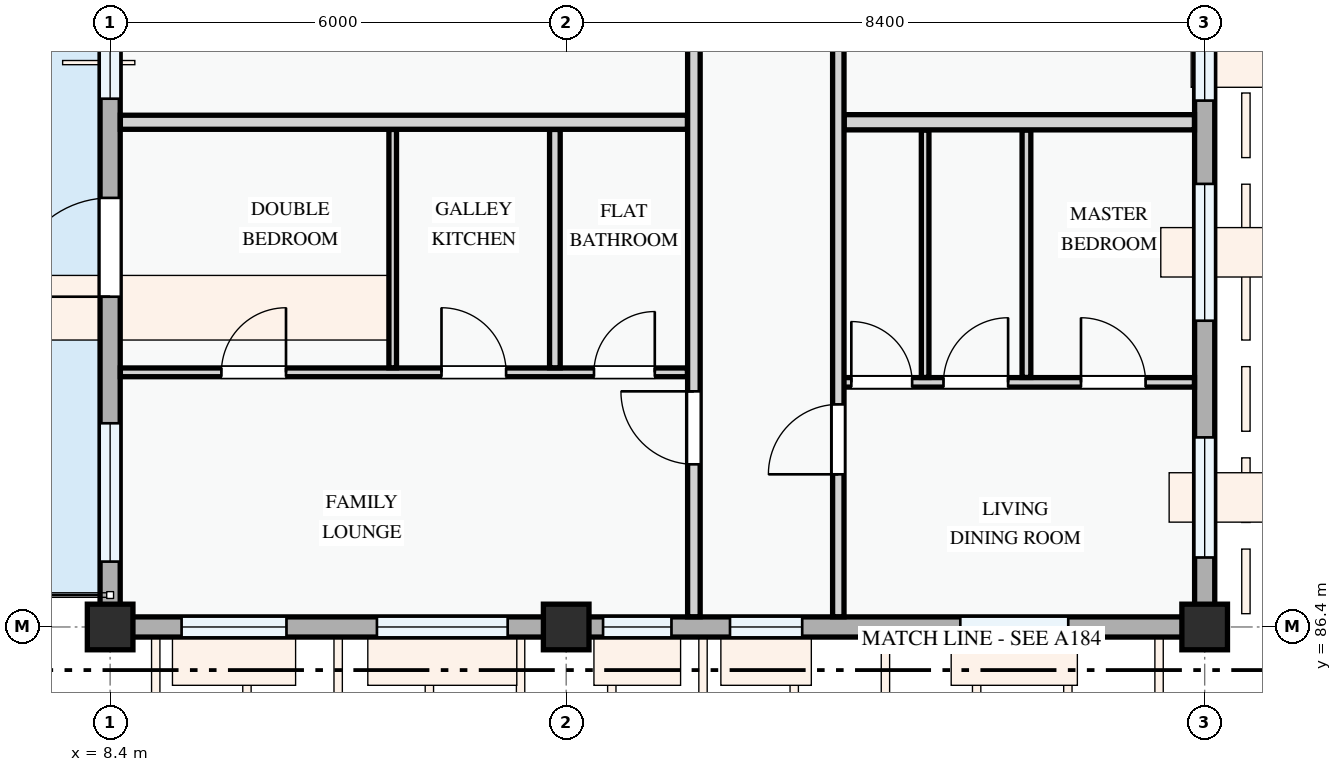
"""IFC4 building model, lengths in metres.
Left out: names, types, materials, properties, quantities, classifications, styles, units other than length and angle.
Written with IfcOpenShell. Run it as: python <this file> out.ifc"""

import sys

from ifc_helpers import new_model, si_unit, direction, frame, frame_2d, origin, origin_2d, place, context, subcontext, project, spatial, rectangle, extrude, element, fill, save


model = new_model("IFC4")
c1 = context("Model", 3, precision=1e-05, world=origin(), true_north=direction((0.0, 1.0)))
c2 = subcontext(c1, "Body", "Model", "MODEL_VIEW")
j1 = project(units=[si_unit("LENGTHUNIT", "METRE"), si_unit("PLANEANGLEUNIT", "RADIAN")], contexts=[c1])
p1 = place(None, origin())
s1 = spatial("IfcSite", under=j1, at=p1, CompositionType="ELEMENT")
p2 = place(p1, origin())
s2 = spatial("IfcBuilding", under=s1, at=p2, CompositionType="ELEMENT")
p3 = place(p2, frame((0.0, 0.0, 34.5)))
s3 = spatial("IfcBuildingStorey", under=s2, at=p3, CompositionType="ELEMENT", Elevation=34.5)
for number, where, z_axis, x_axis in (
    (1, (8.4, 86.4, 0.0), (0.0, 0.0, 1.0), (1.0, 0.0, 0.0)),
    (2, (14.4, 86.4, 0.0), (0.0, 0.0, 1.0), (1.0, 0.0, 0.0)),
    (3, (22.8, 86.4, 0.0), (0.0, 0.0, 1.0), (1.0, 0.0, 0.0)),
):
    element("IfcColumn", number, at=place(p3, frame(where, z_axis=z_axis, x_axis=x_axis)), inside=s3, PredefinedType="COLUMN", context=c2, shape_type="SweptSolid", body=[
        extrude(rectangle(XDim=0.6, YDim=0.6, at=origin_2d()), origin(), (0.0, 0.0, 1.0), 3.3),
    ])
p4 = place(p3, frame((8.4, 94.8, 0.0), z_axis=(0.0, 0.0, 1.0), x_axis=(0.0, -1.0, 0.0)))
e4 = element("IfcWall", 4, at=p4, inside=s3, PredefinedType="STANDARD", context=c2, shape_type="SweptSolid", body=[
    extrude(rectangle(XDim=8.4, YDim=0.265, at=frame_2d((4.2, 0.0))), origin(), (0.0, 0.0, 1.0), 2.345),
])
p5 = place(p4, frame((2.755, 0.0, 0.0)))
e5 = element("IfcOpeningElement", 5, at=p5, cuts=e4, PredefinedType="OPENING", context=c2, shape_type="SweptSolid", body=[
    extrude(rectangle(XDim=1.3, YDim=2.15, at=frame_2d((0.65, 1.075))), frame((0.0, 0.143, 0.0), z_axis=(0.0, -1.0, 0.0), x_axis=(1.0, 0.0, 0.0)), (0.0, 0.0, 1.0), 0.285),
])
p6 = place(p4, frame((0.5, 0.0, 0.78)))
e6 = element("IfcOpeningElement", 6, at=p6, cuts=e4, PredefinedType="OPENING", context=c2, shape_type="SweptSolid", body=[
    extrude(rectangle(XDim=0.95, YDim=1.15, at=frame_2d((0.475, 0.575))), frame((0.0, 0.143, 0.0), z_axis=(0.0, -1.0, 0.0), x_axis=(1.0, 0.0, 0.0)), (0.0, 0.0, 1.0), 0.285),
])
p7 = place(p4, frame((5.72, 0.0, 0.78)))
e7 = element("IfcOpeningElement", 7, at=p7, cuts=e4, PredefinedType="OPENING", context=c2, shape_type="SweptSolid", body=[
    extrude(rectangle(XDim=1.82, YDim=1.46, at=frame_2d((0.91, 0.73))), frame((0.0, 0.143, 0.0), z_axis=(0.0, -1.0, 0.0), x_axis=(1.0, 0.0, 0.0)), (0.0, 0.0, 1.0), 0.285),
])
p8 = place(p3, frame((8.4, 86.4, 0.0), z_axis=(0.0, 0.0, 1.0), x_axis=(1.0, 0.0, 0.0)))
e8 = element("IfcWall", 8, at=p8, inside=s3, PredefinedType="STANDARD", context=c2, shape_type="SweptSolid", body=[
    extrude(rectangle(XDim=6.0, YDim=0.265, at=frame_2d((3.0, 0.0))), origin(), (0.0, 0.0, 1.0), 2.525),
])
p9 = place(p8, frame((0.94, 0.0, 0.78)))
e9 = element("IfcOpeningElement", 9, at=p9, cuts=e8, PredefinedType="OPENING", context=c2, shape_type="SweptSolid", body=[
    extrude(rectangle(XDim=1.38, YDim=1.48, at=frame_2d((0.69, 0.74))), frame((0.0, 0.143, 0.0), z_axis=(0.0, -1.0, 0.0), x_axis=(1.0, 0.0, 0.0)), (0.0, 0.0, 1.0), 0.285),
])
p10 = place(p8, frame((3.51, 0.0, 0.78)))
e10 = element("IfcOpeningElement", 10, at=p10, cuts=e8, PredefinedType="OPENING", context=c2, shape_type="SweptSolid", body=[
    extrude(rectangle(XDim=1.72, YDim=1.52, at=frame_2d((0.86, 0.76))), frame((0.0, 0.143, 0.0), z_axis=(0.0, -1.0, 0.0), x_axis=(1.0, 0.0, 0.0)), (0.0, 0.0, 1.0), 0.285),
])
p11 = place(p3, frame((14.4, 86.4, 0.0), z_axis=(0.0, 0.0, 1.0), x_axis=(1.0, 0.0, 0.0)))
e11 = element("IfcWall", 11, at=p11, inside=s3, PredefinedType="STANDARD", context=c2, shape_type="SweptSolid", body=[
    extrude(rectangle(XDim=8.4, YDim=0.265, at=frame_2d((4.2, 0.0))), origin(), (0.0, 0.0, 1.0), 2.375),
])
p12 = place(p11, frame((0.485, 0.0, 0.78)))
e12 = element("IfcOpeningElement", 12, at=p12, cuts=e11, PredefinedType="OPENING", context=c2, shape_type="SweptSolid", body=[
    extrude(rectangle(XDim=0.9, YDim=1.2, at=frame_2d((0.45, 0.6))), frame((0.0, 0.143, 0.0), z_axis=(0.0, -1.0, 0.0), x_axis=(1.0, 0.0, 0.0)), (0.0, 0.0, 1.0), 0.285),
])
p13 = place(p11, frame((2.155, 0.0, 0.78)))
e13 = element("IfcOpeningElement", 13, at=p13, cuts=e11, PredefinedType="OPENING", context=c2, shape_type="SweptSolid", body=[
    extrude(rectangle(XDim=0.95, YDim=1.15, at=frame_2d((0.475, 0.575))), frame((0.0, 0.143, 0.0), z_axis=(0.0, -1.0, 0.0), x_axis=(1.0, 0.0, 0.0)), (0.0, 0.0, 1.0), 0.285),
])
p14 = place(p11, frame((5.185, 0.0, 0.78)))
e14 = element("IfcOpeningElement", 14, at=p14, cuts=e11, PredefinedType="OPENING", context=c2, shape_type="SweptSolid", body=[
    extrude(rectangle(XDim=1.42, YDim=1.38, at=frame_2d((0.71, 0.69))), frame((0.0, 0.143, 0.0), z_axis=(0.0, -1.0, 0.0), x_axis=(1.0, 0.0, 0.0)), (0.0, 0.0, 1.0), 0.285),
])
p15 = place(p3, frame((22.8, 86.4, 0.0), z_axis=(0.0, 0.0, 1.0), x_axis=(0.0, 1.0, 0.0)))
e15 = element("IfcWall", 15, at=p15, inside=s3, PredefinedType="STANDARD", context=c2, shape_type="SweptSolid", body=[
    extrude(rectangle(XDim=8.4, YDim=0.265, at=frame_2d((4.2, 0.0))), origin(), (0.0, 0.0, 1.0), 2.425),
])
p16 = place(p15, frame((0.914, 0.0, 0.78)))
e16 = element("IfcOpeningElement", 16, at=p16, cuts=e15, PredefinedType="OPENING", context=c2, shape_type="SweptSolid", body=[
    extrude(rectangle(XDim=1.58, YDim=1.48, at=frame_2d((0.79, 0.74))), frame((0.0, 0.143, 0.0), z_axis=(0.0, -1.0, 0.0), x_axis=(1.0, 0.0, 0.0)), (0.0, 0.0, 1.0), 0.285),
])
p17 = place(p15, frame((4.029, 0.0, 0.78)))
e17 = element("IfcOpeningElement", 17, at=p17, cuts=e15, PredefinedType="OPENING", context=c2, shape_type="SweptSolid", body=[
    extrude(rectangle(XDim=1.8, YDim=1.5, at=frame_2d((0.9, 0.75))), frame((0.0, 0.143, 0.0), z_axis=(0.0, -1.0, 0.0), x_axis=(1.0, 0.0, 0.0)), (0.0, 0.0, 1.0), 0.285),
])
p18 = place(p15, frame((6.925, 0.0, 0.78)))
e18 = element("IfcOpeningElement", 18, at=p18, cuts=e15, PredefinedType="OPENING", context=c2, shape_type="SweptSolid", body=[
    extrude(rectangle(XDim=1.0, YDim=1.25, at=frame_2d((0.5, 0.625))), frame((0.0, 0.143, 0.0), z_axis=(0.0, -1.0, 0.0), x_axis=(1.0, 0.0, 0.0)), (0.0, 0.0, 1.0), 0.285),
])
p19 = place(p3, frame((8.534, 89.75, 0.0), z_axis=(0.0, 0.0, 1.0), x_axis=(1.0, 0.0, 0.0)))
e19 = element("IfcWall", 19, at=p19, inside=s3, PredefinedType="PARTITIONING", context=c2, shape_type="SweptSolid", body=[
    extrude(rectangle(XDim=7.461, YDim=0.115, at=frame_2d((3.73, 0.0))), origin(), (0.0, 0.0, 1.0), 3.0),
])
p20 = place(p19, frame((1.329, 0.0, 0.0)))
e20 = element("IfcOpeningElement", 20, at=p20, cuts=e19, PredefinedType="OPENING", context=c2, shape_type="SweptSolid", body=[
    extrude(rectangle(XDim=0.85, YDim=2.1, at=frame_2d((0.425, 1.05))), frame((0.0, 0.067, 0.0), z_axis=(0.0, -1.0, 0.0), x_axis=(1.0, 0.0, 0.0)), (0.0, 0.0, 1.0), 0.135),
])
p21 = place(p19, frame((4.225, 0.0, 0.0)))
e21 = element("IfcOpeningElement", 21, at=p21, cuts=e19, PredefinedType="OPENING", context=c2, shape_type="SweptSolid", body=[
    extrude(rectangle(XDim=0.85, YDim=2.1, at=frame_2d((0.425, 1.05))), frame((0.0, 0.067, 0.0), z_axis=(0.0, -1.0, 0.0), x_axis=(1.0, 0.0, 0.0)), (0.0, 0.0, 1.0), 0.135),
])
p22 = place(p19, frame((6.231, 0.0, 0.0)))
e22 = element("IfcOpeningElement", 22, at=p22, cuts=e19, PredefinedType="OPENING", context=c2, shape_type="SweptSolid", body=[
    extrude(rectangle(XDim=0.8, YDim=2.1, at=frame_2d((0.4, 1.05))), frame((0.0, 0.067, 0.0), z_axis=(0.0, -1.0, 0.0), x_axis=(1.0, 0.0, 0.0)), (0.0, 0.0, 1.0), 0.135),
])
p23 = place(p3, frame((12.118, 89.81, 0.0), z_axis=(0.0, 0.0, 1.0), x_axis=(0.0, 1.0, 0.0)))
e23 = element("IfcWall", 23, at=p23, inside=s3, PredefinedType="PARTITIONING", context=c2, shape_type="SweptSolid", body=[
    extrude(rectangle(XDim=3.136, YDim=0.1, at=frame_2d((1.568, 0.0))), origin(), (0.0, 0.0, 1.0), 3.0),
])
p24 = place(p3, frame((14.251, 89.81, 0.0), z_axis=(0.0, 0.0, 1.0), x_axis=(0.0, 1.0, 0.0)))
e24 = element("IfcWall", 24, at=p24, inside=s3, PredefinedType="PARTITIONING", context=c2, shape_type="SweptSolid", body=[
    extrude(rectangle(XDim=3.136, YDim=0.14, at=frame_2d((1.568, 0.0))), origin(), (0.0, 0.0, 1.0), 2.425),
])
p25 = place(p3, frame((17.98, 89.618, 0.0), z_axis=(0.0, 0.0, 1.0), x_axis=(1.0, 0.0, 0.0)))
e25 = element("IfcWall", 25, at=p25, inside=s3, PredefinedType="PARTITIONING", context=c2, shape_type="SweptSolid", body=[
    extrude(rectangle(XDim=4.686, YDim=0.125, at=frame_2d((2.343, 0.0))), origin(), (0.0, 0.0, 1.0), 3.0),
])
p26 = place(p25, frame((0.171, 0.0, 0.0)))
e26 = element("IfcOpeningElement", 26, at=p26, cuts=e25, PredefinedType="OPENING", context=c2, shape_type="SweptSolid", body=[
    extrude(rectangle(XDim=0.8, YDim=2.1, at=frame_2d((0.4, 1.05))), frame((0.0, 0.073, 0.0), z_axis=(0.0, -1.0, 0.0), x_axis=(1.0, 0.0, 0.0)), (0.0, 0.0, 1.0), 0.145),
])
p27 = place(p25, frame((1.384, 0.0, 0.0)))
e27 = element("IfcOpeningElement", 27, at=p27, cuts=e25, PredefinedType="OPENING", context=c2, shape_type="SweptSolid", body=[
    extrude(rectangle(XDim=0.85, YDim=2.1, at=frame_2d((0.425, 1.05))), frame((0.0, 0.073, 0.0), z_axis=(0.0, -1.0, 0.0), x_axis=(1.0, 0.0, 0.0)), (0.0, 0.0, 1.0), 0.145),
])
p28 = place(p25, frame((3.193, 0.0, 0.0)))
e28 = element("IfcOpeningElement", 28, at=p28, cuts=e25, PredefinedType="OPENING", context=c2, shape_type="SweptSolid", body=[
    extrude(rectangle(XDim=0.85, YDim=2.1, at=frame_2d((0.425, 1.05))), frame((0.0, 0.073, 0.0), z_axis=(0.0, -1.0, 0.0), x_axis=(1.0, 0.0, 0.0)), (0.0, 0.0, 1.0), 0.145),
])
p29 = place(p3, frame((20.455, 89.683, 0.0), z_axis=(0.0, 0.0, 1.0), x_axis=(0.0, 1.0, 0.0)))
e29 = element("IfcWall", 29, at=p29, inside=s3, PredefinedType="PARTITIONING", context=c2, shape_type="SweptSolid", body=[
    extrude(rectangle(XDim=3.255, YDim=0.115, at=frame_2d((1.627, 0.0))), origin(), (0.0, 0.0, 1.0), 3.0),
])
p30 = place(p3, frame((19.122, 89.683, 0.0), z_axis=(0.0, 0.0, 1.0), x_axis=(0.0, 1.0, 0.0)))
e30 = element("IfcWall", 30, at=p30, inside=s3, PredefinedType="PARTITIONING", context=c2, shape_type="SweptSolid", body=[
    extrude(rectangle(XDim=3.255, YDim=0.1, at=frame_2d((1.627, 0.0))), origin(), (0.0, 0.0, 1.0), 3.0),
])
p31 = place(p3, frame((8.534, 93.04, 0.0), z_axis=(0.0, 0.0, 1.0), x_axis=(1.0, 0.0, 0.0)))
e31 = element("IfcWall", 31, at=p31, inside=s3, PredefinedType="PARTITIONING", context=c2, shape_type="SweptSolid", body=[
    extrude(rectangle(XDim=7.461, YDim=0.185, at=frame_2d((3.73, 0.0))), origin(), (0.0, 0.0, 1.0), 3.0),
])
p32 = place(p3, frame((18.057, 93.04, 0.0), z_axis=(0.0, 0.0, 1.0), x_axis=(1.0, 0.0, 0.0)))
e32 = element("IfcWall", 32, at=p32, inside=s3, PredefinedType="PARTITIONING", context=c2, shape_type="SweptSolid", body=[
    extrude(rectangle(XDim=4.609, YDim=0.2, at=frame_2d((2.304, 0.0))), origin(), (0.0, 0.0, 1.0), 3.0),
])
p33 = place(p3, frame((16.08, 86.534, 0.0), z_axis=(0.0, 0.0, 1.0), x_axis=(0.0, 1.0, 0.0)))
e33 = element("IfcWall", 33, at=p33, inside=s3, PredefinedType="PARTITIONING", context=c2, shape_type="SweptSolid", body=[
    extrude(rectangle(XDim=22.806, YDim=0.165, at=frame_2d((11.403, 0.0))), origin(), (0.0, 0.0, 1.0), 3.0),
])
p34 = place(p33, frame((2.006, 0.0, 0.0)))
e34 = element("IfcOpeningElement", 34, at=p34, cuts=e33, PredefinedType="OPENING", context=c2, shape_type="SweptSolid", body=[
    extrude(rectangle(XDim=0.96, YDim=2.12, at=frame_2d((0.48, 1.06))), frame((0.0, 0.093, 0.0), z_axis=(0.0, -1.0, 0.0), x_axis=(1.0, 0.0, 0.0)), (0.0, 0.0, 1.0), 0.185),
])
p35 = place(p33, frame((10.035, 0.0, 0.0)))
e35 = element("IfcOpeningElement", 35, at=p35, cuts=e33, PredefinedType="OPENING", context=c2, shape_type="SweptSolid", body=[
    extrude(rectangle(XDim=0.92, YDim=2.1, at=frame_2d((0.46, 1.05))), frame((0.0, 0.093, 0.0), z_axis=(0.0, -1.0, 0.0), x_axis=(1.0, 0.0, 0.0)), (0.0, 0.0, 1.0), 0.185),
])
p36 = place(p33, frame((18.003, 0.0, 0.0)))
e36 = element("IfcOpeningElement", 36, at=p36, cuts=e33, PredefinedType="OPENING", context=c2, shape_type="SweptSolid", body=[
    extrude(rectangle(XDim=0.92, YDim=2.1, at=frame_2d((0.46, 1.05))), frame((0.0, 0.093, 0.0), z_axis=(0.0, -1.0, 0.0), x_axis=(1.0, 0.0, 0.0)), (0.0, 0.0, 1.0), 0.185),
])
p37 = place(p3, frame((17.98, 86.534, 0.0), z_axis=(0.0, 0.0, 1.0), x_axis=(0.0, 1.0, 0.0)))
e37 = element("IfcWall", 37, at=p37, inside=s3, PredefinedType="PARTITIONING", context=c2, shape_type="SweptSolid", body=[
    extrude(rectangle(XDim=22.806, YDim=0.15, at=frame_2d((11.403, 0.0))), origin(), (0.0, 0.0, 1.0), 3.0),
])
p38 = place(p37, frame((1.874, 0.0, 0.0)))
e38 = element("IfcOpeningElement", 38, at=p38, cuts=e37, PredefinedType="OPENING", context=c2, shape_type="SweptSolid", body=[
    extrude(rectangle(XDim=0.92, YDim=2.1, at=frame_2d((0.46, 1.05))), frame((0.0, 0.085, 0.0), z_axis=(0.0, -1.0, 0.0), x_axis=(1.0, 0.0, 0.0)), (0.0, 0.0, 1.0), 0.17),
])
p39 = place(p37, frame((9.846, 0.0, 0.0)))
e39 = element("IfcOpeningElement", 39, at=p39, cuts=e37, PredefinedType="OPENING", context=c2, shape_type="SweptSolid", body=[
    extrude(rectangle(XDim=0.92, YDim=2.1, at=frame_2d((0.46, 1.05))), frame((0.0, 0.085, 0.0), z_axis=(0.0, -1.0, 0.0), x_axis=(1.0, 0.0, 0.0)), (0.0, 0.0, 1.0), 0.17),
])
p40 = place(p37, frame((17.992, 0.0, 0.0)))
e40 = element("IfcOpeningElement", 40, at=p40, cuts=e37, PredefinedType="OPENING", context=c2, shape_type="SweptSolid", body=[
    extrude(rectangle(XDim=0.96, YDim=2.12, at=frame_2d((0.48, 1.06))), frame((0.0, 0.085, 0.0), z_axis=(0.0, -1.0, 0.0), x_axis=(1.0, 0.0, 0.0)), (0.0, 0.0, 1.0), 0.17),
])
p41 = place(p5, frame((1.3, 0.0, 0.0), z_axis=(0.0, 0.0, 1.0), x_axis=(-1.0, 0.0, 0.0)))
e41 = element("IfcDoor", 41, at=p41, inside=s3, OperationType="SINGLE_SWING_LEFT", PredefinedType="DOOR", context=c2, shape_type="SweptSolid", body=[
    extrude(rectangle(XDim=1.3, YDim=2.15, at=frame_2d((0.65, 1.075))), frame((0.0, 0.025, 0.0), z_axis=(0.0, -1.0, 0.0), x_axis=(1.0, 0.0, 0.0)), (0.0, 0.0, 1.0), 0.05),
])
fill(e5, e41)
p42 = place(p6, origin())
e42 = element("IfcWindow", 42, at=p42, inside=s3, PartitioningType="SINGLE_PANEL", PredefinedType="WINDOW", context=c2, shape_type="SweptSolid", body=[
    extrude(rectangle(XDim=0.95, YDim=1.15, at=frame_2d((0.475, 0.575))), frame((0.0, 0.03, 0.0), z_axis=(0.0, -1.0, 0.0), x_axis=(1.0, 0.0, 0.0)), (0.0, 0.0, 1.0), 0.06),
])
fill(e6, e42)
p43 = place(p7, origin())
e43 = element("IfcWindow", 43, at=p43, inside=s3, PartitioningType="DOUBLE_PANEL_VERTICAL", PredefinedType="WINDOW", context=c2, shape_type="SweptSolid", body=[
    extrude(rectangle(XDim=1.82, YDim=1.46, at=frame_2d((0.91, 0.73))), frame((0.0, 0.03, 0.0), z_axis=(0.0, -1.0, 0.0), x_axis=(1.0, 0.0, 0.0)), (0.0, 0.0, 1.0), 0.06),
])
fill(e7, e43)
p44 = place(p9, origin())
e44 = element("IfcWindow", 44, at=p44, inside=s3, PartitioningType="SINGLE_PANEL", PredefinedType="WINDOW", context=c2, shape_type="SweptSolid", body=[
    extrude(rectangle(XDim=1.38, YDim=1.48, at=frame_2d((0.69, 0.74))), frame((0.0, 0.03, 0.0), z_axis=(0.0, -1.0, 0.0), x_axis=(1.0, 0.0, 0.0)), (0.0, 0.0, 1.0), 0.06),
])
fill(e9, e44)
p45 = place(p10, origin())
e45 = element("IfcWindow", 45, at=p45, inside=s3, PartitioningType="DOUBLE_PANEL_VERTICAL", PredefinedType="WINDOW", context=c2, shape_type="SweptSolid", body=[
    extrude(rectangle(XDim=1.72, YDim=1.52, at=frame_2d((0.86, 0.76))), frame((0.0, 0.03, 0.0), z_axis=(0.0, -1.0, 0.0), x_axis=(1.0, 0.0, 0.0)), (0.0, 0.0, 1.0), 0.06),
])
fill(e10, e45)
p46 = place(p12, origin())
e46 = element("IfcWindow", 46, at=p46, inside=s3, PartitioningType="SINGLE_PANEL", PredefinedType="WINDOW", context=c2, shape_type="SweptSolid", body=[
    extrude(rectangle(XDim=0.9, YDim=1.2, at=frame_2d((0.45, 0.6))), frame((0.0, 0.03, 0.0), z_axis=(0.0, -1.0, 0.0), x_axis=(1.0, 0.0, 0.0)), (0.0, 0.0, 1.0), 0.06),
])
fill(e12, e46)
p47 = place(p13, origin())
e47 = element("IfcWindow", 47, at=p47, inside=s3, PartitioningType="SINGLE_PANEL", PredefinedType="WINDOW", context=c2, shape_type="SweptSolid", body=[
    extrude(rectangle(XDim=0.95, YDim=1.15, at=frame_2d((0.475, 0.575))), frame((0.0, 0.03, 0.0), z_axis=(0.0, -1.0, 0.0), x_axis=(1.0, 0.0, 0.0)), (0.0, 0.0, 1.0), 0.06),
])
fill(e13, e47)
p48 = place(p14, origin())
e48 = element("IfcWindow", 48, at=p48, inside=s3, PartitioningType="SINGLE_PANEL", PredefinedType="WINDOW", context=c2, shape_type="SweptSolid", body=[
    extrude(rectangle(XDim=1.42, YDim=1.38, at=frame_2d((0.71, 0.69))), frame((0.0, 0.03, 0.0), z_axis=(0.0, -1.0, 0.0), x_axis=(1.0, 0.0, 0.0)), (0.0, 0.0, 1.0), 0.06),
])
fill(e14, e48)
p49 = place(p16, origin())
e49 = element("IfcWindow", 49, at=p49, inside=s3, PartitioningType="SINGLE_PANEL", PredefinedType="WINDOW", context=c2, shape_type="SweptSolid", body=[
    extrude(rectangle(XDim=1.58, YDim=1.48, at=frame_2d((0.79, 0.74))), frame((0.0, 0.03, 0.0), z_axis=(0.0, -1.0, 0.0), x_axis=(1.0, 0.0, 0.0)), (0.0, 0.0, 1.0), 0.06),
])
fill(e16, e49)
p50 = place(p17, origin())
e50 = element("IfcWindow", 50, at=p50, inside=s3, PartitioningType="DOUBLE_PANEL_VERTICAL", PredefinedType="WINDOW", context=c2, shape_type="SweptSolid", body=[
    extrude(rectangle(XDim=1.8, YDim=1.5, at=frame_2d((0.9, 0.75))), frame((0.0, 0.03, 0.0), z_axis=(0.0, -1.0, 0.0), x_axis=(1.0, 0.0, 0.0)), (0.0, 0.0, 1.0), 0.06),
])
fill(e17, e50)
p51 = place(p18, origin())
e51 = element("IfcWindow", 51, at=p51, inside=s3, PartitioningType="SINGLE_PANEL", PredefinedType="WINDOW", context=c2, shape_type="SweptSolid", body=[
    extrude(rectangle(XDim=1.0, YDim=1.25, at=frame_2d((0.5, 0.625))), frame((0.0, 0.03, 0.0), z_axis=(0.0, -1.0, 0.0), x_axis=(1.0, 0.0, 0.0)), (0.0, 0.0, 1.0), 0.06),
])
fill(e18, e51)
p52 = place(p20, origin())
e52 = element("IfcDoor", 52, at=p52, inside=s3, OperationType="SINGLE_SWING_RIGHT", PredefinedType="DOOR", context=c2, shape_type="SweptSolid", body=[
    extrude(rectangle(XDim=0.85, YDim=2.1, at=frame_2d((0.425, 1.05))), frame((0.0, 0.025, 0.0), z_axis=(0.0, -1.0, 0.0), x_axis=(1.0, 0.0, 0.0)), (0.0, 0.0, 1.0), 0.05),
])
fill(e20, e52)
p53 = place(p21, origin())
e53 = element("IfcDoor", 53, at=p53, inside=s3, OperationType="SINGLE_SWING_LEFT", PredefinedType="DOOR", context=c2, shape_type="SweptSolid", body=[
    extrude(rectangle(XDim=0.85, YDim=2.1, at=frame_2d((0.425, 1.05))), frame((0.0, 0.025, 0.0), z_axis=(0.0, -1.0, 0.0), x_axis=(1.0, 0.0, 0.0)), (0.0, 0.0, 1.0), 0.05),
])
fill(e21, e53)
p54 = place(p22, origin())
e54 = element("IfcDoor", 54, at=p54, inside=s3, OperationType="SINGLE_SWING_RIGHT", PredefinedType="DOOR", context=c2, shape_type="SweptSolid", body=[
    extrude(rectangle(XDim=0.8, YDim=2.1, at=frame_2d((0.4, 1.05))), frame((0.0, 0.025, 0.0), z_axis=(0.0, -1.0, 0.0), x_axis=(1.0, 0.0, 0.0)), (0.0, 0.0, 1.0), 0.05),
])
fill(e22, e54)
p55 = place(p26, origin())
e55 = element("IfcDoor", 55, at=p55, inside=s3, OperationType="SINGLE_SWING_LEFT", PredefinedType="DOOR", context=c2, shape_type="SweptSolid", body=[
    extrude(rectangle(XDim=0.8, YDim=2.1, at=frame_2d((0.4, 1.05))), frame((0.0, 0.025, 0.0), z_axis=(0.0, -1.0, 0.0), x_axis=(1.0, 0.0, 0.0)), (0.0, 0.0, 1.0), 0.05),
])
fill(e26, e55)
p56 = place(p27, origin())
e56 = element("IfcDoor", 56, at=p56, inside=s3, OperationType="SINGLE_SWING_RIGHT", PredefinedType="DOOR", context=c2, shape_type="SweptSolid", body=[
    extrude(rectangle(XDim=0.85, YDim=2.1, at=frame_2d((0.425, 1.05))), frame((0.0, 0.025, 0.0), z_axis=(0.0, -1.0, 0.0), x_axis=(1.0, 0.0, 0.0)), (0.0, 0.0, 1.0), 0.05),
])
fill(e27, e56)
p57 = place(p28, origin())
e57 = element("IfcDoor", 57, at=p57, inside=s3, OperationType="SINGLE_SWING_LEFT", PredefinedType="DOOR", context=c2, shape_type="SweptSolid", body=[
    extrude(rectangle(XDim=0.85, YDim=2.1, at=frame_2d((0.425, 1.05))), frame((0.0, 0.025, 0.0), z_axis=(0.0, -1.0, 0.0), x_axis=(1.0, 0.0, 0.0)), (0.0, 0.0, 1.0), 0.05),
])
fill(e28, e57)
p58 = place(p34, origin())
e58 = element("IfcDoor", 58, at=p58, inside=s3, OperationType="SINGLE_SWING_RIGHT", PredefinedType="DOOR", context=c2, shape_type="SweptSolid", body=[
    extrude(rectangle(XDim=0.96, YDim=2.12, at=frame_2d((0.48, 1.06))), frame((0.0, 0.025, 0.0), z_axis=(0.0, -1.0, 0.0), x_axis=(1.0, 0.0, 0.0)), (0.0, 0.0, 1.0), 0.05),
])
fill(e34, e58)
p59 = place(p38, origin())
e59 = element("IfcDoor", 59, at=p59, inside=s3, OperationType="SINGLE_SWING_LEFT", PredefinedType="DOOR", context=c2, shape_type="SweptSolid", body=[
    extrude(rectangle(XDim=0.92, YDim=2.1, at=frame_2d((0.46, 1.05))), frame((0.0, 0.025, 0.0), z_axis=(0.0, -1.0, 0.0), x_axis=(1.0, 0.0, 0.0)), (0.0, 0.0, 1.0), 0.05),
])
fill(e38, e59)
save(model, sys.argv[1])
